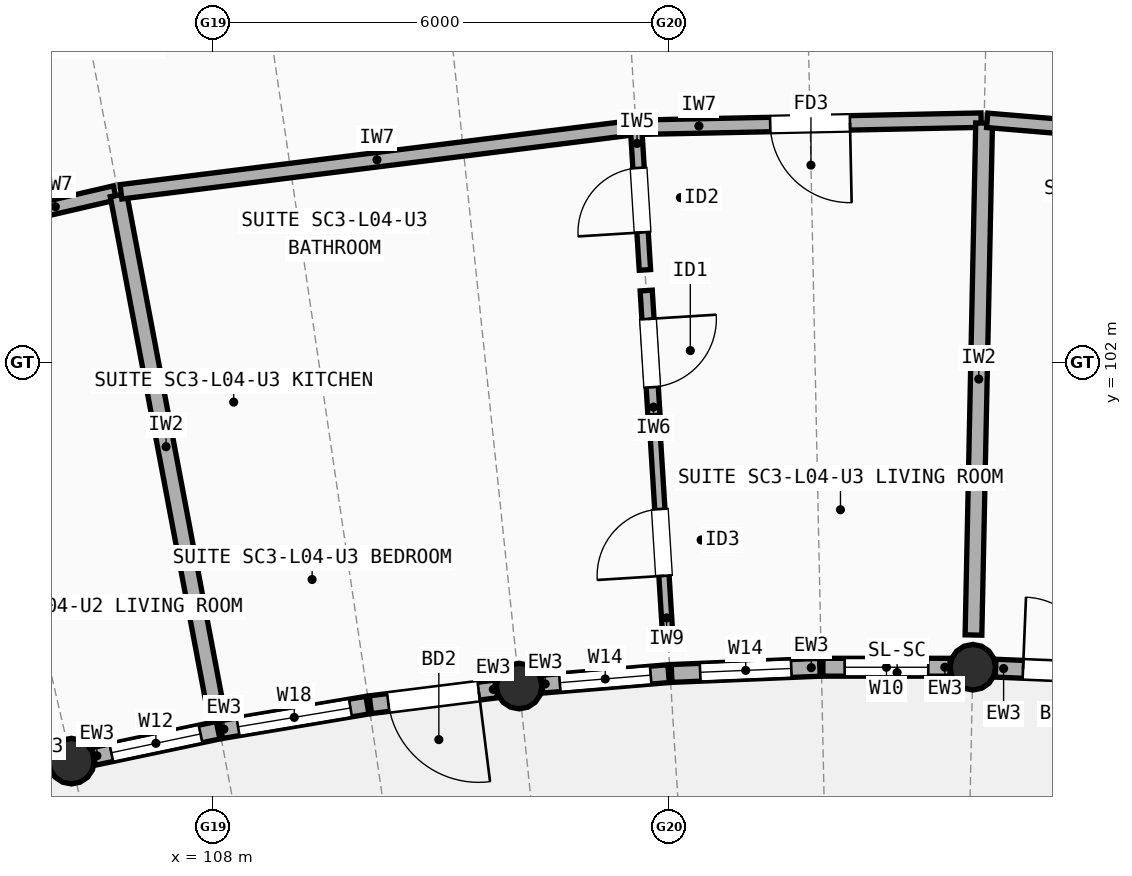
"""IFC4 building model, lengths in metres.
Left out: names, types, materials, properties, quantities, classifications, styles, units other than length and angle.
Written with IfcOpenShell. Run it as: python <this file> out.ifc"""

import sys

from ifc_helpers import new_model, si_unit, direction, frame, frame_2d, origin, origin_2d, place, context, subcontext, project, spatial, rectangle, circle, extrude, element, fill, save


model = new_model("IFC4")
c1 = context("Model", 3, precision=1e-05, world=origin(), true_north=direction((0.0, 1.0)))
c2 = subcontext(c1, "Body", "Model", "MODEL_VIEW")
j1 = project(units=[si_unit("LENGTHUNIT", "METRE"), si_unit("PLANEANGLEUNIT", "RADIAN")], contexts=[c1])
p1 = place(None, origin())
s1 = spatial("IfcSite", under=j1, at=p1, CompositionType="ELEMENT")
p2 = place(p1, origin())
s2 = spatial("IfcBuilding", under=s1, at=p2, CompositionType="ELEMENT")
p3 = place(p2, frame((0.0, 0.0, 14.1)))
s3 = spatial("IfcBuildingStorey", under=s2, at=p3, CompositionType="ELEMENT", Elevation=14.1)
for number, where, z_axis, x_axis in (
    (1, (106.136, 96.754, 0.0), (0.0, 0.0, 1.0), (1.0, 0.0, 0.0)),
    (2, (112.028, 97.742, 0.0), (0.0, 0.0, 1.0), (1.0, 0.0, 0.0)),
    (3, (117.996, 97.99, 0.0), (0.0, 0.0, 1.0), (1.0, 0.0, 0.0)),
):
    element("IfcColumn", number, at=place(p3, frame(where, z_axis=z_axis, x_axis=x_axis)), inside=s3, PredefinedType="COLUMN", context=c2, shape_type="SweptSolid", body=[
        extrude(circle(Radius=0.3, at=origin_2d()), origin(), (0.0, 0.0, 1.0), 2.948),
    ])
p4 = place(p3, frame((106.43, 96.816, 0.0), z_axis=(0.0, 0.0, 1.0), x_axis=(0.978524995622, 0.206128195408, 0.0)))
e4 = element("IfcWall", 4, at=p4, inside=s3, PredefinedType="STANDARD", context=c2, shape_type="SweptSolid", body=[
    extrude(rectangle(XDim=1.672, YDim=0.235, at=frame_2d((0.836, 0.0))), origin(), (0.0, 0.0, 1.0), 2.684),
])
p5 = place(p4, frame((0.236, 0.0, 0.85)))
e5 = element("IfcOpeningElement", 5, at=p5, cuts=e4, PredefinedType="OPENING", context=c2, shape_type="SweptSolid", body=[
    extrude(rectangle(XDim=1.2, YDim=1.35, at=frame_2d((0.6, 0.675))), frame((0.0, 0.127, 0.0), z_axis=(0.0, -1.0, 0.0), x_axis=(1.0, 0.0, 0.0)), (0.0, 0.0, 1.0), 0.255),
])
p6 = place(p3, frame((108.105, 97.168, 0.0), z_axis=(0.0, 0.0, 1.0), x_axis=(0.986241418229, 0.165311418144, 0.0)))
e6 = element("IfcWall", 6, at=p6, inside=s3, PredefinedType="STANDARD", context=c2, shape_type="SweptSolid", body=[
    extrude(rectangle(XDim=1.952, YDim=0.235, at=frame_2d((0.976, 0.0))), origin(), (0.0, 0.0, 1.0), 2.684),
])
p7 = place(p6, frame((0.226, 0.0, 0.85)))
e7 = element("IfcOpeningElement", 7, at=p7, cuts=e6, PredefinedType="OPENING", context=c2, shape_type="SweptSolid", body=[
    extrude(rectangle(XDim=1.5, YDim=1.4, at=frame_2d((0.75, 0.7))), frame((0.0, 0.127, 0.0), z_axis=(0.0, -1.0, 0.0), x_axis=(1.0, 0.0, 0.0)), (0.0, 0.0, 1.0), 0.255),
])
p8 = place(p3, frame((110.071, 97.497, 0.0), z_axis=(0.0, 0.0, 1.0), x_axis=(0.992253152049, 0.124232371987, 0.0)))
e8 = element("IfcWall", 8, at=p8, inside=s3, PredefinedType="STANDARD", context=c2, shape_type="SweptSolid", body=[
    extrude(rectangle(XDim=1.672, YDim=0.235, at=frame_2d((0.836, 0.0))), origin(), (0.0, 0.0, 1.0), 2.684),
])
p9 = place(p8, frame((0.236, 0.0, 0.0)))
e9 = element("IfcOpeningElement", 9, at=p9, cuts=e8, PredefinedType="OPENING", context=c2, shape_type="SweptSolid", body=[
    extrude(rectangle(XDim=1.2, YDim=2.15, at=frame_2d((0.6, 1.075))), frame((0.0, 0.127, 0.0), z_axis=(0.0, -1.0, 0.0), x_axis=(1.0, 0.0, 0.0)), (0.0, 0.0, 1.0), 0.255),
])
p10 = place(p3, frame((112.327, 97.767, 0.0), z_axis=(0.0, 0.0, 1.0), x_axis=(0.996556823189, 0.082912593463, 0.0)))
e10 = element("IfcWall", 10, at=p10, inside=s3, PredefinedType="STANDARD", context=c2, shape_type="SweptSolid", body=[
    extrude(rectangle(XDim=1.673, YDim=0.235, at=frame_2d((0.836, 0.0))), origin(), (0.0, 0.0, 1.0), 2.684),
])
p11 = place(p10, frame((0.236, 0.0, 0.85)))
e11 = element("IfcOpeningElement", 11, at=p11, cuts=e10, PredefinedType="OPENING", context=c2, shape_type="SweptSolid", body=[
    extrude(rectangle(XDim=1.2, YDim=1.5, at=frame_2d((0.6, 0.75))), frame((0.0, 0.127, 0.0), z_axis=(0.0, -1.0, 0.0), x_axis=(1.0, 0.0, 0.0)), (0.0, 0.0, 1.0), 0.255),
])
p12 = place(p3, frame((114.033, 97.908, 0.0), z_axis=(0.0, 0.0, 1.0), x_axis=(0.999132639597, 0.041640947307, 0.0)))
e12 = element("IfcWall", 12, at=p12, inside=s3, PredefinedType="STANDARD", context=c2, shape_type="SweptSolid", body=[
    extrude(rectangle(XDim=1.952, YDim=0.235, at=frame_2d((0.976, 0.0))), origin(), (0.0, 0.0, 1.0), 2.684),
])
p13 = place(p12, frame((0.376, 0.0, 0.85)))
e13 = element("IfcOpeningElement", 13, at=p13, cuts=e12, PredefinedType="OPENING", context=c2, shape_type="SweptSolid", body=[
    extrude(rectangle(XDim=1.2, YDim=1.5, at=frame_2d((0.6, 0.75))), frame((0.0, 0.127, 0.0), z_axis=(0.0, -1.0, 0.0), x_axis=(1.0, 0.0, 0.0)), (0.0, 0.0, 1.0), 0.255),
])
p14 = place(p3, frame((116.024, 97.99, 0.0), z_axis=(0.0, 0.0, 1.0), x_axis=(1.0, 0.0, 0.0)))
e14 = element("IfcWall", 14, at=p14, inside=s3, PredefinedType="STANDARD", context=c2, shape_type="SweptSolid", body=[
    extrude(rectangle(XDim=1.673, YDim=0.235, at=frame_2d((0.836, 0.0))), origin(), (0.0, 0.0, 1.0), 2.684),
])
p15 = place(p14, frame((0.286, 0.0, 0.85)))
e15 = element("IfcOpeningElement", 15, at=p15, cuts=e14, PredefinedType="OPENING", context=c2, shape_type="SweptSolid", body=[
    extrude(rectangle(XDim=1.1, YDim=1.45, at=frame_2d((0.55, 0.725))), frame((0.0, 0.127, 0.0), z_axis=(0.0, -1.0, 0.0), x_axis=(1.0, 0.0, 0.0)), (0.0, 0.0, 1.0), 0.255),
])
p16 = place(p3, frame((118.296, 97.977, 0.0), z_axis=(0.0, 0.0, 1.0), x_axis=(0.999134084838, -0.041606255725, 0.0)))
e16 = element("IfcWall", 16, at=p16, inside=s3, PredefinedType="STANDARD", context=c2, shape_type="SweptSolid", body=[
    extrude(rectangle(XDim=1.672, YDim=0.235, at=frame_2d((0.836, 0.0))), origin(), (0.0, 0.0, 1.0), 2.684),
])
p17 = place(p16, frame((0.361, 0.0, 0.0)))
e17 = element("IfcOpeningElement", 17, at=p17, cuts=e16, PredefinedType="OPENING", context=c2, shape_type="SweptSolid", body=[
    extrude(rectangle(XDim=0.95, YDim=2.12, at=frame_2d((0.475, 1.06))), frame((0.0, 0.127, 0.0), z_axis=(0.0, -1.0, 0.0), x_axis=(1.0, 0.0, 0.0)), (0.0, 0.0, 1.0), 0.255),
])
p18 = place(p3, frame((102.325, 103.212, 0.0), z_axis=(0.0, 0.0, 1.0), x_axis=(0.974052809246, 0.226320844821, 0.0)))
e18 = element("IfcWall", 18, at=p18, inside=s3, PredefinedType="SOLIDWALL", context=c2, shape_type="SweptSolid", body=[
    extrude(rectangle(XDim=4.501, YDim=0.19, at=frame_2d((2.251, 0.0))), origin(), (0.0, 0.0, 1.0), 2.722),
])
p19 = place(p18, frame((1.761, 0.0, 0.0)))
e19 = element("IfcOpeningElement", 19, at=p19, cuts=e18, PredefinedType="OPENING", context=c2, shape_type="SweptSolid", body=[
    extrude(rectangle(XDim=0.98, YDim=2.15, at=frame_2d((0.49, 1.075))), frame((0.0, 0.105, 0.0), z_axis=(0.0, -1.0, 0.0), x_axis=(1.0, 0.0, 0.0)), (0.0, 0.0, 1.0), 0.21),
])
p20 = place(p3, frame((108.007, 97.582, 0.0), z_axis=(0.0, 0.0, 1.0), x_axis=(-0.185712925624, 0.982604045003, 0.0)))
e20 = element("IfcWall", 20, at=p20, inside=s3, PredefinedType="SOLIDWALL", context=c2, shape_type="SweptSolid", body=[
    extrude(rectangle(XDim=6.736, YDim=0.22, at=frame_2d((3.368, 0.0))), origin(), (0.0, 0.0, 1.0), 2.742),
])
p21 = place(p3, frame((106.788, 104.245, 0.0), z_axis=(0.0, 0.0, 1.0), x_axis=(0.992257394877, 0.124198479504, 0.0)))
e21 = element("IfcWall", 21, at=p21, inside=s3, PredefinedType="SOLIDWALL", context=c2, shape_type="SweptSolid", body=[
    extrude(rectangle(XDim=6.79, YDim=0.19, at=frame_2d((3.395, 0.0))), origin(), (0.0, 0.0, 1.0), 2.722),
])
p22 = place(p3, frame((113.605, 105.094, 0.0), z_axis=(0.0, 0.0, 1.0), x_axis=(0.999785356511, 0.020718129879, 0.0)))
e22 = element("IfcWall", 22, at=p22, inside=s3, PredefinedType="SOLIDWALL", context=c2, shape_type="SweptSolid", body=[
    extrude(rectangle(XDim=4.501, YDim=0.19, at=frame_2d((2.251, 0.0))), origin(), (0.0, 0.0, 1.0), 2.762),
])
p23 = place(p22, frame((1.726, 0.0, 0.0)))
e23 = element("IfcOpeningElement", 23, at=p23, cuts=e22, PredefinedType="OPENING", context=c2, shape_type="SweptSolid", body=[
    extrude(rectangle(XDim=1.05, YDim=2.15, at=frame_2d((0.525, 1.075))), frame((0.0, 0.105, 0.0), z_axis=(0.0, -1.0, 0.0), x_axis=(1.0, 0.0, 0.0)), (0.0, 0.0, 1.0), 0.21),
])
p24 = place(p3, frame((113.993, 98.234, 0.0), z_axis=(0.0, 0.0, 1.0), x_axis=(-0.062253438174, 0.998060373643, 0.0)))
e24 = element("IfcWall", 24, at=p24, inside=s3, PredefinedType="PARTITIONING", context=c2, shape_type="SweptSolid", body=[
    extrude(rectangle(XDim=2.8, YDim=0.135, at=frame_2d((1.4, 0.0))), origin(), (0.0, 0.0, 1.0), 2.742),
])
p25 = place(p24, frame((0.96, 0.0, 0.0)))
e25 = element("IfcOpeningElement", 25, at=p25, cuts=e24, PredefinedType="OPENING", context=c2, shape_type="SweptSolid", body=[
    extrude(rectangle(XDim=0.88, YDim=2.1, at=frame_2d((0.44, 1.05))), frame((0.0, 0.077, 0.0), z_axis=(0.0, -1.0, 0.0), x_axis=(1.0, 0.0, 0.0)), (0.0, 0.0, 1.0), 0.155),
])
p26 = place(p3, frame((113.802, 101.3, 0.0), z_axis=(0.0, 0.0, 1.0), x_axis=(-0.062064740375, 0.998072125651, 0.0)))
e26 = element("IfcWall", 26, at=p26, inside=s3, PredefinedType="PLUMBINGWALL", context=c2, shape_type="SweptSolid", body=[
    extrude(rectangle(XDim=1.648, YDim=0.16, at=frame_2d((0.824, 0.0))), origin(), (0.0, 0.0, 1.0), 2.742),
])
p27 = place(p26, frame((0.374, 0.0, 0.0)))
e27 = element("IfcOpeningElement", 27, at=p27, cuts=e26, PredefinedType="OPENING", context=c2, shape_type="SweptSolid", body=[
    extrude(rectangle(XDim=0.9, YDim=2.1, at=frame_2d((0.45, 1.05))), frame((0.0, 0.09, 0.0), z_axis=(0.0, -1.0, 0.0), x_axis=(1.0, 0.0, 0.0)), (0.0, 0.0, 1.0), 0.18),
])
p28 = place(p3, frame((113.682, 103.217, 0.0), z_axis=(0.0, 0.0, 1.0), x_axis=(-0.062229594869, 0.998061860569, 0.0)))
e28 = element("IfcWall", 28, at=p28, inside=s3, PredefinedType="PARTITIONING", context=c2, shape_type="SweptSolid", body=[
    extrude(rectangle(XDim=1.84, YDim=0.15, at=frame_2d((0.92, 0.0))), origin(), (0.0, 0.0, 1.0), 2.742),
])
p29 = place(p28, frame((0.495, 0.0, 0.0)))
e29 = element("IfcOpeningElement", 29, at=p29, cuts=e28, PredefinedType="OPENING", context=c2, shape_type="SweptSolid", body=[
    extrude(rectangle(XDim=0.85, YDim=2.1, at=frame_2d((0.425, 1.05))), frame((0.0, 0.085, 0.0), z_axis=(0.0, -1.0, 0.0), x_axis=(1.0, 0.0, 0.0)), (0.0, 0.0, 1.0), 0.17),
])
p30 = place(p3, frame((118.005, 98.414, 0.0), z_axis=(0.0, 0.0, 1.0), x_axis=(0.020767678819, 0.999784328501, 0.0)))
e30 = element("IfcWall", 30, at=p30, inside=s3, PredefinedType="SOLIDWALL", context=c2, shape_type="SweptSolid", body=[
    extrude(rectangle(XDim=6.736, YDim=0.22, at=frame_2d((3.368, 0.0))), origin(), (0.0, 0.0, 1.0), 2.722),
])
p31 = place(p3, frame((118.186, 105.185, 0.0), z_axis=(0.0, 0.0, 1.0), x_axis=(0.996556165996, -0.082920492126, 0.0)))
e31 = element("IfcWall", 31, at=p31, inside=s3, PredefinedType="SOLIDWALL", context=c2, shape_type="SweptSolid", body=[
    extrude(rectangle(XDim=6.79, YDim=0.19, at=frame_2d((3.395, 0.0))), origin(), (0.0, 0.0, 1.0), 2.742),
])
p32 = place(p5, origin())
e32 = element("IfcWindow", 32, at=p32, inside=s3, PartitioningType="SINGLE_PANEL", PredefinedType="WINDOW", context=c2, shape_type="SweptSolid", body=[
    extrude(rectangle(XDim=1.2, YDim=1.35, at=frame_2d((0.6, 0.675))), frame((0.0, 0.03, 0.0), z_axis=(0.0, -1.0, 0.0), x_axis=(1.0, 0.0, 0.0)), (0.0, 0.0, 1.0), 0.06),
])
fill(e5, e32)
p33 = place(p7, origin())
e33 = element("IfcWindow", 33, at=p33, inside=s3, PartitioningType="SINGLE_PANEL", PredefinedType="WINDOW", context=c2, shape_type="SweptSolid", body=[
    extrude(rectangle(XDim=1.5, YDim=1.4, at=frame_2d((0.75, 0.7))), frame((0.0, 0.03, 0.0), z_axis=(0.0, -1.0, 0.0), x_axis=(1.0, 0.0, 0.0)), (0.0, 0.0, 1.0), 0.06),
])
fill(e7, e33)
p34 = place(p9, frame((1.2, 0.0, 0.0), z_axis=(0.0, 0.0, 1.0), x_axis=(-1.0, 0.0, 0.0)))
e34 = element("IfcDoor", 34, at=p34, inside=s3, OperationType="SINGLE_SWING_RIGHT", PredefinedType="DOOR", context=c2, shape_type="SweptSolid", body=[
    extrude(rectangle(XDim=1.2, YDim=2.15, at=frame_2d((0.6, 1.075))), frame((0.0, 0.025, 0.0), z_axis=(0.0, -1.0, 0.0), x_axis=(1.0, 0.0, 0.0)), (0.0, 0.0, 1.0), 0.05),
])
fill(e9, e34)
p35 = place(p11, origin())
e35 = element("IfcWindow", 35, at=p35, inside=s3, PartitioningType="SINGLE_PANEL", PredefinedType="WINDOW", context=c2, shape_type="SweptSolid", body=[
    extrude(rectangle(XDim=1.2, YDim=1.5, at=frame_2d((0.6, 0.75))), frame((0.0, 0.03, 0.0), z_axis=(0.0, -1.0, 0.0), x_axis=(1.0, 0.0, 0.0)), (0.0, 0.0, 1.0), 0.06),
])
fill(e11, e35)
p36 = place(p13, origin())
e36 = element("IfcWindow", 36, at=p36, inside=s3, PartitioningType="SINGLE_PANEL", PredefinedType="WINDOW", context=c2, shape_type="SweptSolid", body=[
    extrude(rectangle(XDim=1.2, YDim=1.5, at=frame_2d((0.6, 0.75))), frame((0.0, 0.03, 0.0), z_axis=(0.0, -1.0, 0.0), x_axis=(1.0, 0.0, 0.0)), (0.0, 0.0, 1.0), 0.06),
])
fill(e13, e36)
p37 = place(p15, origin())
e37 = element("IfcWindow", 37, at=p37, inside=s3, PartitioningType="SINGLE_PANEL", PredefinedType="WINDOW", context=c2, shape_type="SweptSolid", body=[
    extrude(rectangle(XDim=1.1, YDim=1.45, at=frame_2d((0.55, 0.725))), frame((0.0, 0.03, 0.0), z_axis=(0.0, -1.0, 0.0), x_axis=(1.0, 0.0, 0.0)), (0.0, 0.0, 1.0), 0.06),
])
fill(e15, e37)
p38 = place(p17, frame((0.95, 0.0, 0.0), z_axis=(0.0, 0.0, 1.0), x_axis=(-1.0, 0.0, 0.0)))
e38 = element("IfcDoor", 38, at=p38, inside=s3, OperationType="SINGLE_SWING_LEFT", PredefinedType="DOOR", context=c2, shape_type="SweptSolid", body=[
    extrude(rectangle(XDim=0.95, YDim=2.12, at=frame_2d((0.475, 1.06))), frame((0.0, 0.025, 0.0), z_axis=(0.0, -1.0, 0.0), x_axis=(1.0, 0.0, 0.0)), (0.0, 0.0, 1.0), 0.05),
])
fill(e17, e38)
p39 = place(p23, origin())
e39 = element("IfcDoor", 39, at=p39, inside=s3, OperationType="SINGLE_SWING_RIGHT", PredefinedType="DOOR", context=c2, shape_type="SweptSolid", body=[
    extrude(rectangle(XDim=1.05, YDim=2.15, at=frame_2d((0.525, 1.075))), frame((0.0, 0.025, 0.0), z_axis=(0.0, -1.0, 0.0), x_axis=(1.0, 0.0, 0.0)), (0.0, 0.0, 1.0), 0.05),
])
fill(e23, e39)
p40 = place(p25, origin())
e40 = element("IfcDoor", 40, at=p40, inside=s3, OperationType="SINGLE_SWING_LEFT", PredefinedType="DOOR", context=c2, shape_type="SweptSolid", body=[
    extrude(rectangle(XDim=0.88, YDim=2.1, at=frame_2d((0.44, 1.05))), frame((0.0, 0.025, 0.0), z_axis=(0.0, -1.0, 0.0), x_axis=(1.0, 0.0, 0.0)), (0.0, 0.0, 1.0), 0.05),
])
fill(e25, e40)
p41 = place(p27, origin())
e41 = element("IfcDoor", 41, at=p41, inside=s3, OperationType="SINGLE_SWING_RIGHT", PredefinedType="DOOR", context=c2, shape_type="SweptSolid", body=[
    extrude(rectangle(XDim=0.9, YDim=2.1, at=frame_2d((0.45, 1.05))), frame((0.0, 0.025, 0.0), z_axis=(0.0, -1.0, 0.0), x_axis=(1.0, 0.0, 0.0)), (0.0, 0.0, 1.0), 0.05),
])
fill(e27, e41)
p42 = place(p29, origin())
e42 = element("IfcDoor", 42, at=p42, inside=s3, OperationType="SINGLE_SWING_LEFT", PredefinedType="DOOR", context=c2, shape_type="SweptSolid", body=[
    extrude(rectangle(XDim=0.85, YDim=2.1, at=frame_2d((0.425, 1.05))), frame((0.0, 0.025, 0.0), z_axis=(0.0, -1.0, 0.0), x_axis=(1.0, 0.0, 0.0)), (0.0, 0.0, 1.0), 0.05),
])
fill(e29, e42)
save(model, sys.argv[1])
